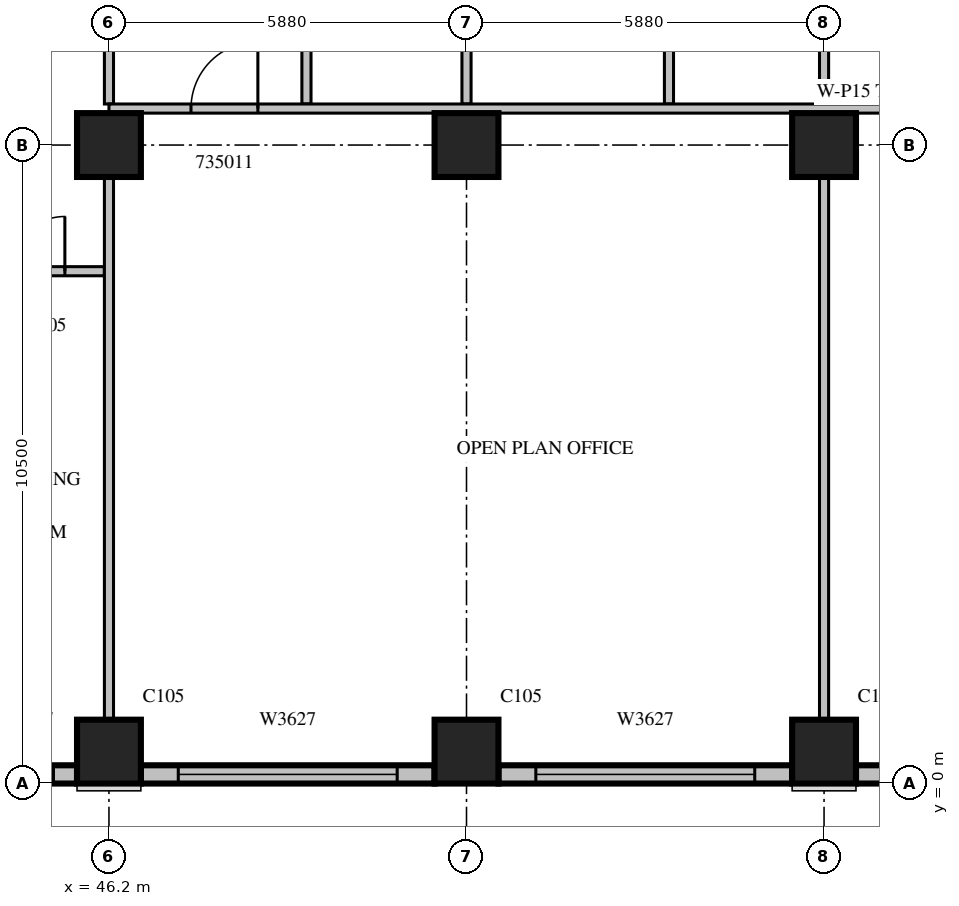
"""IFC4 building model, lengths in metres.
Left out: names, types, materials, properties, quantities, classifications, styles, units other than length and angle.
Written with IfcOpenShell. Run it as: python <this file> out.ifc"""

import sys

from ifc_helpers import new_model, si_unit, direction, frame, frame_2d, origin, origin_2d, place, context, subcontext, project, spatial, rectangle, extrude, source, transform, mapped, element, fill, save


model = new_model("IFC4")
c1 = context("Model", 3, precision=1e-05, world=origin(), true_north=direction((0.0, 1.0)))
c2 = subcontext(c1, "Body", "Model", "MODEL_VIEW")
j1 = project(units=[si_unit("LENGTHUNIT", "METRE"), si_unit("PLANEANGLEUNIT", "RADIAN")], contexts=[c1])
p1 = place(None, origin())
s1 = spatial("IfcSite", under=j1, at=p1, CompositionType="ELEMENT")
p2 = place(p1, origin())
s2 = spatial("IfcBuilding", under=s1, at=p2, CompositionType="ELEMENT")
p3 = place(p2, frame((0.0, 0.0, 158.1)))
s3 = spatial("IfcBuildingStorey", under=s2, at=p3, CompositionType="ELEMENT", Elevation=158.1)
m1 = source(origin(), c2, "Body", "SweptSolid", [
    extrude(rectangle(XDim=1.05, YDim=1.05, at=origin_2d()), origin(), (0.0, 0.0, 1.0), 4.2),
])
for number, where, z_axis, x_axis in (
    (1, (46.2, 0.525, 0.0), (0.0, 0.0, 1.0), (1.0, 0.0, 0.0)),
    (2, (52.08, 0.525, 0.0), (0.0, 0.0, 1.0), (1.0, 0.0, 0.0)),
    (3, (57.96, 0.525, 0.0), (0.0, 0.0, 1.0), (1.0, 0.0, 0.0)),
    (4, (46.2, 10.5, 0.0), (0.0, 0.0, 1.0), (1.0, 0.0, 0.0)),
    (5, (52.08, 10.5, 0.0), (0.0, 0.0, 1.0), (1.0, 0.0, 0.0)),
    (6, (57.96, 10.5, 0.0), (0.0, 0.0, 1.0), (1.0, 0.0, 0.0)),
):
    element("IfcColumn", number, at=place(p3, frame(where, z_axis=z_axis, x_axis=x_axis)), inside=s3, PredefinedType="COLUMN", context=c2, shape_type="MappedRepresentation", body=[
        mapped(m1, transform((0.0, 0.0, 0.0), scale=1.0)),
    ])
m2 = source(origin(), c2, "Body", "SweptSolid", [
    extrude(rectangle(XDim=1.675, YDim=0.3, at=frame_2d((0.838, 0.0))), origin(), (0.0, 0.0, 1.0), 3.8),
])
p4 = place(p3, frame((44.0, 0.15, 0.0), z_axis=(0.0, 0.0, 1.0), x_axis=(1.0, 0.0, 0.0)))
e7 = element("IfcWall", 7, at=p4, inside=s3, PredefinedType="STANDARD", context=c2, shape_type="MappedRepresentation", body=[
    mapped(m2, transform((0.0, 0.0, 0.0), scale=1.0)),
])
m3 = source(origin(), c2, "Body", "SweptSolid", [
    extrude(rectangle(XDim=0.9, YDim=2.7, at=frame_2d((0.45, 1.35))), frame((0.0, 0.16, 0.0), z_axis=(0.0, -1.0, 0.0), x_axis=(1.0, 0.0, 0.0)), (0.0, 0.0, 1.0), 0.32),
])
p5 = place(p4, frame((0.388, 0.0, 0.6)))
e8 = element("IfcOpeningElement", 8, at=p5, cuts=e7, PredefinedType="OPENING", context=c2, shape_type="MappedRepresentation", body=[
    mapped(m3, transform((0.0, 0.0, 0.0), scale=1.0)),
])
m4 = source(origin(), c2, "Body", "SweptSolid", [
    extrude(rectangle(XDim=4.83, YDim=0.3, at=frame_2d((2.415, 0.0))), origin(), (0.0, 0.0, 1.0), 3.8),
])
p6 = place(p3, frame((46.725, 0.15, 0.0), z_axis=(0.0, 0.0, 1.0), x_axis=(1.0, 0.0, 0.0)))
e9 = element("IfcWall", 9, at=p6, inside=s3, PredefinedType="STANDARD", context=c2, shape_type="MappedRepresentation", body=[
    mapped(m4, transform((0.0, 0.0, 0.0), scale=1.0)),
])
m5 = source(origin(), c2, "Body", "SweptSolid", [
    extrude(rectangle(XDim=3.6, YDim=2.7, at=frame_2d((1.8, 1.35))), frame((0.0, 0.16, 0.0), z_axis=(0.0, -1.0, 0.0), x_axis=(1.0, 0.0, 0.0)), (0.0, 0.0, 1.0), 0.32),
])
p7 = place(p6, frame((0.615, 0.0, 0.6)))
e10 = element("IfcOpeningElement", 10, at=p7, cuts=e9, PredefinedType="OPENING", context=c2, shape_type="MappedRepresentation", body=[
    mapped(m5, transform((0.0, 0.0, 0.0), scale=1.0)),
])
p8 = place(p3, frame((52.605, 0.15, 0.0), z_axis=(0.0, 0.0, 1.0), x_axis=(1.0, 0.0, 0.0)))
e11 = element("IfcWall", 11, at=p8, inside=s3, PredefinedType="STANDARD", context=c2, shape_type="MappedRepresentation", body=[
    mapped(m4, transform((0.0, 0.0, 0.0), scale=1.0)),
])
p9 = place(p8, frame((0.615, 0.0, 0.6)))
e12 = element("IfcOpeningElement", 12, at=p9, cuts=e11, PredefinedType="OPENING", context=c2, shape_type="MappedRepresentation", body=[
    mapped(m5, transform((0.0, 0.0, 0.0), scale=1.0)),
])
p10 = place(p3, frame((58.485, 0.15, 0.0), z_axis=(0.0, 0.0, 1.0), x_axis=(1.0, 0.0, 0.0)))
e13 = element("IfcWall", 13, at=p10, inside=s3, PredefinedType="STANDARD", context=c2, shape_type="MappedRepresentation", body=[
    mapped(m4, transform((0.0, 0.0, 0.0), scale=1.0)),
])
m6 = source(origin(), c2, "Body", "SweptSolid", [
    extrude(rectangle(XDim=1.8, YDim=2.7, at=frame_2d((0.9, 1.35))), frame((0.0, 0.16, 0.0), z_axis=(0.0, -1.0, 0.0), x_axis=(1.0, 0.0, 0.0)), (0.0, 0.0, 1.0), 0.32),
])
p11 = place(p10, frame((0.953, 0.0, 0.6)))
e14 = element("IfcOpeningElement", 14, at=p11, cuts=e13, PredefinedType="OPENING", context=c2, shape_type="MappedRepresentation", body=[
    mapped(m6, transform((0.0, 0.0, 0.0), scale=1.0)),
])
m7 = source(origin(), c2, "Body", "SweptSolid", [
    extrude(rectangle(XDim=2.2, YDim=0.15, at=frame_2d((1.1, 0.0))), origin(), (0.0, 0.0, 1.0), 3.8),
])
p12 = place(p3, frame((46.125, 8.425, 0.0), z_axis=(0.0, 0.0, 1.0), x_axis=(-1.0, 0.0, 0.0)))
e15 = element("IfcWall", 15, at=p12, inside=s3, PredefinedType="PARTITIONING", context=c2, shape_type="MappedRepresentation", body=[
    mapped(m7, transform((0.0, 0.0, 0.0), scale=1.0)),
])
m8 = source(origin(), c2, "Body", "SweptSolid", [
    extrude(rectangle(XDim=0.9, YDim=2.1, at=frame_2d((0.45, 1.05))), frame((0.0, 0.085, 0.0), z_axis=(0.0, -1.0, 0.0), x_axis=(1.0, 0.0, 0.0)), (0.0, 0.0, 1.0), 0.17),
])
p13 = place(p12, frame((0.65, 0.0, 0.0)))
e16 = element("IfcOpeningElement", 16, at=p13, cuts=e15, PredefinedType="OPENING", context=c2, shape_type="MappedRepresentation", body=[
    mapped(m8, transform((0.0, 0.0, 0.0), scale=1.0)),
])
m9 = source(origin(), c2, "Body", "SweptSolid", [
    extrude(rectangle(XDim=3.525, YDim=0.15, at=frame_2d((1.762, 0.0))), origin(), (0.0, 0.0, 1.0), 3.8),
])
for number, where, z_axis, x_axis in (
    (17, (49.448, 11.175, 0.0), (0.0, 0.0, 1.0), (0.0, 1.0, 0.0)),
    (18, (52.08, 11.175, 0.0), (0.0, 0.0, 1.0), (0.0, 1.0, 0.0)),
    (19, (55.41, 11.175, 0.0), (0.0, 0.0, 1.0), (0.0, 1.0, 0.0)),
):
    element("IfcWall", number, at=place(p3, frame(where, z_axis=z_axis, x_axis=x_axis)), inside=s3, PredefinedType="PARTITIONING", context=c2, shape_type="MappedRepresentation", body=[
        mapped(m9, transform((0.0, 0.0, 0.0), scale=1.0)),
    ])
m10 = source(origin(), c2, "Body", "SweptSolid", [
    extrude(rectangle(XDim=8.927, YDim=0.15, at=frame_2d((4.463, 0.0))), origin(), (0.0, 0.0, 1.0), 3.8),
])
p14 = place(p3, frame((46.2, 1.049, 0.0), z_axis=(0.0, 0.0, 1.0), x_axis=(0.0, 1.0, 0.0)))
e20 = element("IfcWall", 20, at=p14, inside=s3, PredefinedType="PARTITIONING", context=c2, shape_type="MappedRepresentation", body=[
    mapped(m10, transform((0.0, 0.0, 0.0), scale=1.0)),
])
p15 = place(p3, frame((46.2, 11.175, 0.0), z_axis=(0.0, 0.0, 1.0), x_axis=(0.0, 1.0, 0.0)))
e21 = element("IfcWall", 21, at=p15, inside=s3, PredefinedType="PARTITIONING", context=c2, shape_type="MappedRepresentation", body=[
    mapped(m9, transform((0.0, 0.0, 0.0), scale=1.0)),
])
p16 = place(p3, frame((57.96, 1.049, 0.0), z_axis=(0.0, 0.0, 1.0), x_axis=(0.0, 1.0, 0.0)))
e22 = element("IfcWall", 22, at=p16, inside=s3, PredefinedType="PARTITIONING", context=c2, shape_type="MappedRepresentation", body=[
    mapped(m10, transform((0.0, 0.0, 0.0), scale=1.0)),
])
p17 = place(p3, frame((57.96, 11.175, 0.0), z_axis=(0.0, 0.0, 1.0), x_axis=(0.0, 1.0, 0.0)))
e23 = element("IfcWall", 23, at=p17, inside=s3, PredefinedType="PARTITIONING", context=c2, shape_type="MappedRepresentation", body=[
    mapped(m9, transform((0.0, 0.0, 0.0), scale=1.0)),
])
m11 = source(origin(), c2, "Body", "SweptSolid", [
    extrude(rectangle(XDim=24.9, YDim=0.15, at=frame_2d((12.45, 0.0))), origin(), (0.0, 0.0, 1.0), 3.8),
])
p18 = place(p3, frame((71.1, 11.1, 0.0), z_axis=(0.0, 0.0, 1.0), x_axis=(-1.0, 0.0, 0.0)))
e24 = element("IfcWall", 24, at=p18, inside=s3, PredefinedType="PARTITIONING", context=c2, shape_type="MappedRepresentation", body=[
    mapped(m11, transform((0.0, 0.0, 0.0), scale=1.0)),
])
m12 = source(origin(), c2, "Body", "SweptSolid", [
    extrude(rectangle(XDim=1.1, YDim=2.1, at=frame_2d((0.55, 1.05))), frame((0.0, 0.085, 0.0), z_axis=(0.0, -1.0, 0.0), x_axis=(1.0, 0.0, 0.0)), (0.0, 0.0, 1.0), 0.17),
])
p19 = place(p18, frame((22.451, 0.0, 0.0)))
e25 = element("IfcOpeningElement", 25, at=p19, cuts=e24, PredefinedType="OPENING", context=c2, shape_type="MappedRepresentation", body=[
    mapped(m12, transform((0.0, 0.0, 0.0), scale=1.0)),
])
p20 = place(p18, frame((2.041, 0.0, 0.0)))
e26 = element("IfcOpeningElement", 26, at=p20, cuts=e24, PredefinedType="OPENING", context=c2, shape_type="MappedRepresentation", body=[
    mapped(m12, transform((0.0, 0.0, 0.0), scale=1.0)),
])
m13 = source(origin(), c2, "Body", "SweptSolid", [
    extrude(rectangle(XDim=0.9, YDim=2.7, at=frame_2d((0.45, 1.35))), frame((0.0, 0.03, 0.0), z_axis=(0.0, -1.0, 0.0), x_axis=(1.0, 0.0, 0.0)), (0.0, 0.0, 1.0), 0.06),
])
p21 = place(p5, origin())
e27 = element("IfcWindow", 27, at=p21, inside=s3, PartitioningType="SINGLE_PANEL", PredefinedType="WINDOW", context=c2, shape_type="MappedRepresentation", body=[
    mapped(m13, transform((0.0, 0.0, 0.0), scale=1.0)),
])
fill(e8, e27)
m14 = source(origin(), c2, "Body", "SweptSolid", [
    extrude(rectangle(XDim=3.6, YDim=2.7, at=frame_2d((1.8, 1.35))), frame((0.0, 0.03, 0.0), z_axis=(0.0, -1.0, 0.0), x_axis=(1.0, 0.0, 0.0)), (0.0, 0.0, 1.0), 0.06),
])
p22 = place(p7, origin())
e28 = element("IfcWindow", 28, at=p22, inside=s3, PartitioningType="SINGLE_PANEL", PredefinedType="WINDOW", context=c2, shape_type="MappedRepresentation", body=[
    mapped(m14, transform((0.0, 0.0, 0.0), scale=1.0)),
])
fill(e10, e28)
p23 = place(p9, origin())
e29 = element("IfcWindow", 29, at=p23, inside=s3, PartitioningType="SINGLE_PANEL", PredefinedType="WINDOW", context=c2, shape_type="MappedRepresentation", body=[
    mapped(m14, transform((0.0, 0.0, 0.0), scale=1.0)),
])
fill(e12, e29)
m15 = source(origin(), c2, "Body", "SweptSolid", [
    extrude(rectangle(XDim=0.9, YDim=2.1, at=frame_2d((0.45, 1.05))), frame((0.0, 0.025, 0.0), z_axis=(0.0, -1.0, 0.0), x_axis=(1.0, 0.0, 0.0)), (0.0, 0.0, 1.0), 0.05),
])
p24 = place(p13, origin())
e30 = element("IfcDoor", 30, at=p24, inside=s3, OperationType="SINGLE_SWING_RIGHT", PredefinedType="DOOR", context=c2, shape_type="MappedRepresentation", body=[
    mapped(m15, transform((0.0, 0.0, 0.0), scale=1.0)),
])
fill(e16, e30)
m16 = source(origin(), c2, "Body", "SweptSolid", [
    extrude(rectangle(XDim=1.1, YDim=2.1, at=frame_2d((0.55, 1.05))), frame((0.0, 0.025, 0.0), z_axis=(0.0, -1.0, 0.0), x_axis=(1.0, 0.0, 0.0)), (0.0, 0.0, 1.0), 0.05),
])
p25 = place(p19, origin())
e31 = element("IfcDoor", 31, at=p25, inside=s3, OperationType="SINGLE_SWING_RIGHT", PredefinedType="DOOR", context=c2, shape_type="MappedRepresentation", body=[
    mapped(m16, transform((0.0, 0.0, 0.0), scale=1.0)),
])
fill(e25, e31)
save(model, sys.argv[1])
